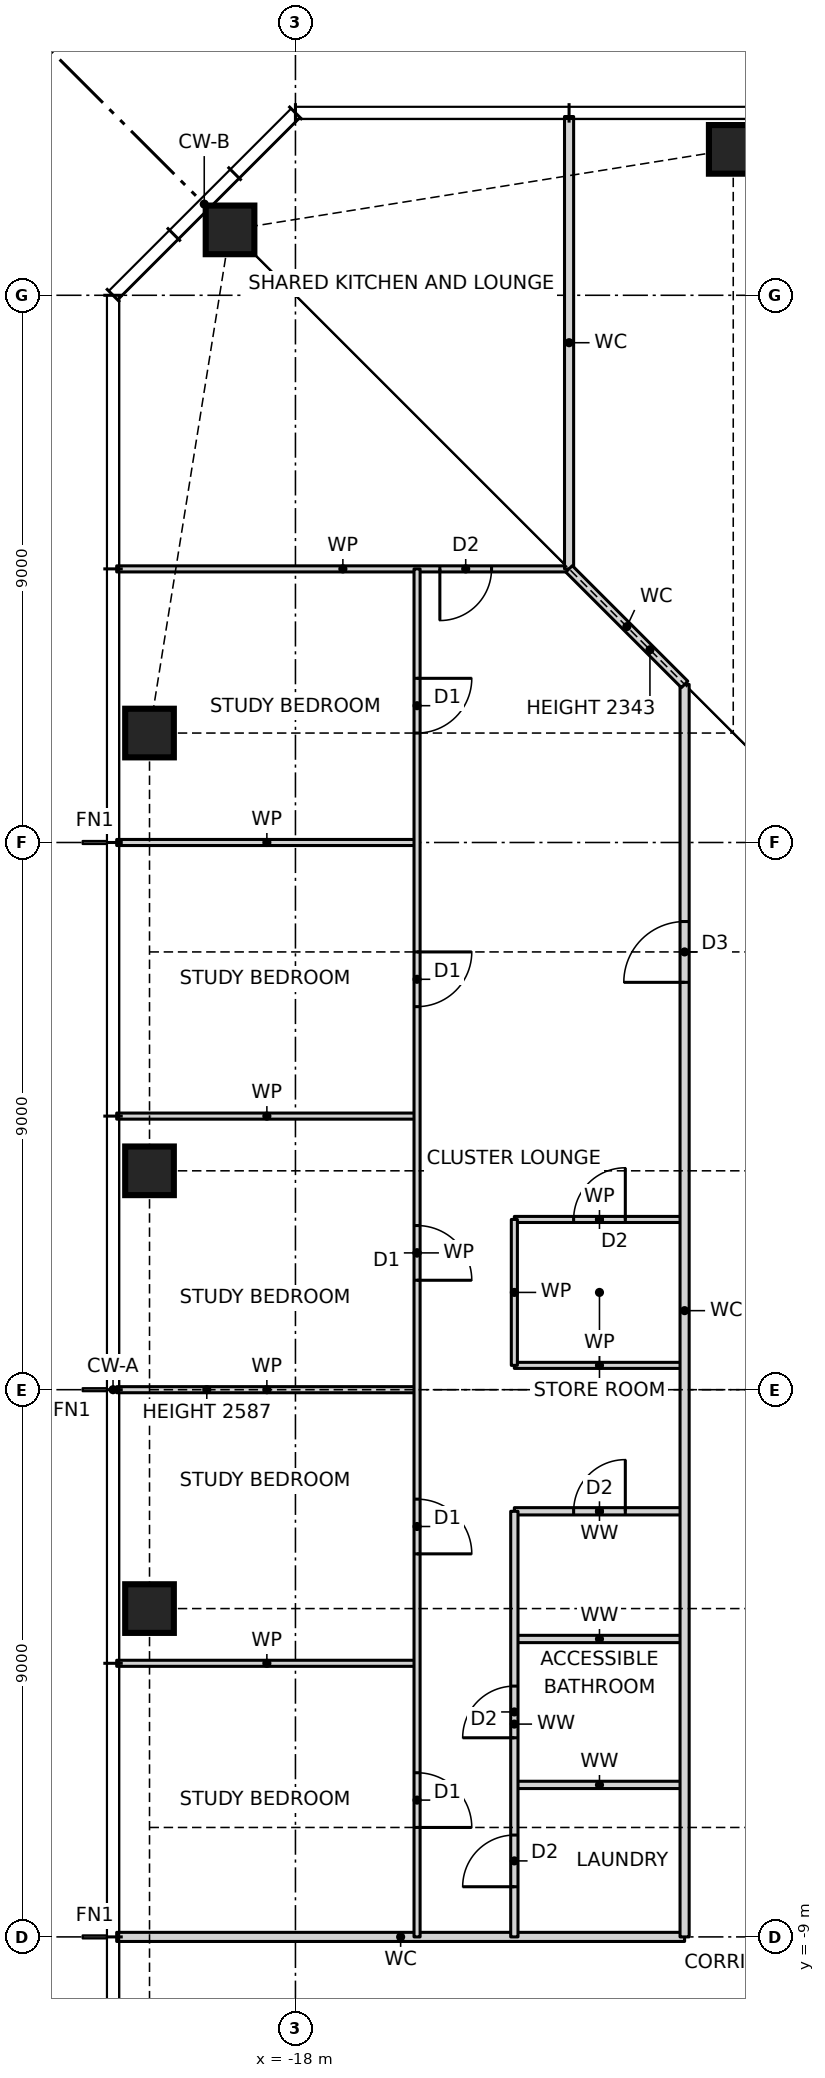
"""IFC4 building model, lengths in metres.
Left out: names, types, materials, properties, quantities, classifications, styles, units other than length and angle.
Written with IfcOpenShell. Run it as: python <this file> out.ifc"""

import sys

from ifc_helpers import new_model, si_unit, direction, frame, frame_2d, origin, origin_2d, place, context, subcontext, project, spatial, rectangle, hollow_rectangle, extrude, element, fill, save


model = new_model("IFC4")
c1 = context("Model", 3, precision=1e-05, world=origin(), true_north=direction((0.0, 1.0)))
c2 = subcontext(c1, "Body", "Model", "MODEL_VIEW")
j1 = project(units=[si_unit("LENGTHUNIT", "METRE"), si_unit("PLANEANGLEUNIT", "RADIAN")], contexts=[c1])
p1 = place(None, origin())
s1 = spatial("IfcSite", under=j1, at=p1, CompositionType="ELEMENT")
p2 = place(p1, origin())
s2 = spatial("IfcBuilding", under=s1, at=p2, CompositionType="ELEMENT")
p3 = place(p2, frame((0.0, 0.0, 84.0)))
s3 = spatial("IfcBuildingStorey", under=s2, at=p3, CompositionType="ELEMENT", Elevation=84.0)
for number, where, z_axis, x_axis in (
    (1, (-10.8, 20.4, 0.0), (0.0, 0.0, 1.0), (1.0, 0.0, 0.0)),
    (2, (-19.076, 19.076, 0.0), (0.0, 0.0, 1.0), (1.0, 0.0, 0.0)),
    (3, (-20.4, 10.8, 0.0), (0.0, 0.0, 1.0), (1.0, 0.0, 0.0)),
    (4, (-20.4, 3.6, 0.0), (0.0, 0.0, 1.0), (1.0, 0.0, 0.0)),
    (5, (-20.4, -3.6, 0.0), (0.0, 0.0, 1.0), (1.0, 0.0, 0.0)),
):
    element("IfcColumn", number, at=place(p3, frame(where, z_axis=z_axis, x_axis=x_axis)), inside=s3, PredefinedType="COLUMN", context=c2, shape_type="SweptSolid", body=[
        extrude(hollow_rectangle(XDim=0.8, YDim=0.8, WallThickness=0.07, at=origin_2d()), origin(), (0.0, 0.0, 1.0), 3.5),
    ])
p4 = place(p3, frame((-20.94, -9.0, 0.0), z_axis=(0.0, 0.0, 1.0), x_axis=(1.0, 0.0, 0.0)))
e6 = element("IfcWall", 6, at=p4, inside=s3, PredefinedType="PARTITIONING", context=c2, shape_type="SweptSolid", body=[
    extrude(rectangle(XDim=9.34, YDim=0.15, at=frame_2d((4.67, 0.0))), origin(), (0.0, 0.0, 1.0), 3.27),
])
p5 = place(p3, frame((-14.4, -6.5, 0.0), z_axis=(0.0, 0.0, 1.0), x_axis=(1.0, 0.0, 0.0)))
e7 = element("IfcWall", 7, at=p5, inside=s3, PredefinedType="PARTITIONING", context=c2, shape_type="SweptSolid", body=[
    extrude(rectangle(XDim=2.8, YDim=0.12, at=frame_2d((1.4, 0.0))), origin(), (0.0, 0.0, 1.0), 3.27),
])
p6 = place(p3, frame((-20.94, -4.5, 0.0), z_axis=(0.0, 0.0, 1.0), x_axis=(1.0, 0.0, 0.0)))
e8 = element("IfcWall", 8, at=p6, inside=s3, PredefinedType="PARTITIONING", context=c2, shape_type="SweptSolid", body=[
    extrude(rectangle(XDim=4.94, YDim=0.1, at=frame_2d((2.47, 0.0))), origin(), (0.0, 0.0, 1.0), 3.27),
])
p7 = place(p3, frame((-14.4, -4.1, 0.0), z_axis=(0.0, 0.0, 1.0), x_axis=(1.0, 0.0, 0.0)))
e9 = element("IfcWall", 9, at=p7, inside=s3, PredefinedType="PARTITIONING", context=c2, shape_type="SweptSolid", body=[
    extrude(rectangle(XDim=2.8, YDim=0.12, at=frame_2d((1.4, 0.0))), origin(), (0.0, 0.0, 1.0), 3.27),
])
p8 = place(p3, frame((-14.4, -2.0, 0.0), z_axis=(0.0, 0.0, 1.0), x_axis=(1.0, 0.0, 0.0)))
e10 = element("IfcWall", 10, at=p8, inside=s3, PredefinedType="PARTITIONING", context=c2, shape_type="SweptSolid", body=[
    extrude(rectangle(XDim=2.8, YDim=0.12, at=frame_2d((1.4, 0.0))), origin(), (0.0, 0.0, 1.0), 3.27),
])
p9 = place(p8, frame((0.975, 0.0, 0.0)))
e11 = element("IfcOpeningElement", 11, at=p9, cuts=e10, PredefinedType="OPENING", context=c2, shape_type="SweptSolid", body=[
    extrude(rectangle(XDim=0.85, YDim=2.1, at=frame_2d((0.425, 1.05))), frame((0.0, 0.07, 0.0), z_axis=(0.0, -1.0, 0.0), x_axis=(1.0, 0.0, 0.0)), (0.0, 0.0, 1.0), 0.14),
])
p10 = place(p3, frame((-20.94, 0.0, 0.0), z_axis=(0.0, 0.0, 1.0), x_axis=(1.0, 0.0, 0.0)))
e12 = element("IfcWall", 12, at=p10, inside=s3, PredefinedType="PARTITIONING", context=c2, shape_type="SweptSolid", body=[
    extrude(rectangle(XDim=4.94, YDim=0.1, at=frame_2d((2.47, 0.0))), origin(), (0.0, 0.0, 1.0), 2.587),
])
p11 = place(p3, frame((-14.4, 0.4, 0.0), z_axis=(0.0, 0.0, 1.0), x_axis=(1.0, 0.0, 0.0)))
e13 = element("IfcWall", 13, at=p11, inside=s3, PredefinedType="PARTITIONING", context=c2, shape_type="SweptSolid", body=[
    extrude(rectangle(XDim=2.8, YDim=0.1, at=frame_2d((1.4, 0.0))), origin(), (0.0, 0.0, 1.0), 3.27),
])
p12 = place(p3, frame((-14.4, 2.8, 0.0), z_axis=(0.0, 0.0, 1.0), x_axis=(1.0, 0.0, 0.0)))
e14 = element("IfcWall", 14, at=p12, inside=s3, PredefinedType="PARTITIONING", context=c2, shape_type="SweptSolid", body=[
    extrude(rectangle(XDim=2.8, YDim=0.1, at=frame_2d((1.4, 0.0))), origin(), (0.0, 0.0, 1.0), 3.27),
])
p13 = place(p12, frame((0.975, 0.0, 0.0)))
e15 = element("IfcOpeningElement", 15, at=p13, cuts=e14, PredefinedType="OPENING", context=c2, shape_type="SweptSolid", body=[
    extrude(rectangle(XDim=0.85, YDim=2.1, at=frame_2d((0.425, 1.05))), frame((0.0, 0.06, 0.0), z_axis=(0.0, -1.0, 0.0), x_axis=(1.0, 0.0, 0.0)), (0.0, 0.0, 1.0), 0.12),
])
for number, where, z_axis, x_axis in (
    (16, (-20.94, 4.5, 0.0), (0.0, 0.0, 1.0), (1.0, 0.0, 0.0)),
    (17, (-20.94, 9.0, 0.0), (0.0, 0.0, 1.0), (1.0, 0.0, 0.0)),
):
    element("IfcWall", number, at=place(p3, frame(where, z_axis=z_axis, x_axis=x_axis)), inside=s3, PredefinedType="PARTITIONING", context=c2, shape_type="SweptSolid", body=[
        extrude(rectangle(XDim=4.94, YDim=0.1, at=frame_2d((2.47, 0.0))), origin(), (0.0, 0.0, 1.0), 3.27),
    ])
p14 = place(p3, frame((-20.94, 13.5, 0.0), z_axis=(0.0, 0.0, 1.0), x_axis=(1.0, 0.0, 0.0)))
e18 = element("IfcWall", 18, at=p14, inside=s3, PredefinedType="PARTITIONING", context=c2, shape_type="SweptSolid", body=[
    extrude(rectangle(XDim=7.44, YDim=0.1, at=frame_2d((3.72, 0.0))), origin(), (0.0, 0.0, 1.0), 3.27),
])
p15 = place(p14, frame((5.315, 0.0, 0.0)))
e19 = element("IfcOpeningElement", 19, at=p15, cuts=e18, PredefinedType="OPENING", context=c2, shape_type="SweptSolid", body=[
    extrude(rectangle(XDim=0.85, YDim=2.1, at=frame_2d((0.425, 1.05))), frame((0.0, 0.06, 0.0), z_axis=(0.0, -1.0, 0.0), x_axis=(1.0, 0.0, 0.0)), (0.0, 0.0, 1.0), 0.12),
])
p16 = place(p3, frame((-11.6, -9.0, 0.0), z_axis=(0.0, 0.0, 1.0), x_axis=(0.0, 1.0, 0.0)))
e20 = element("IfcWall", 20, at=p16, inside=s3, PredefinedType="PARTITIONING", context=c2, shape_type="SweptSolid", body=[
    extrude(rectangle(XDim=20.6, YDim=0.15, at=frame_2d((10.3, 0.0))), origin(), (0.0, 0.0, 1.0), 3.27),
])
p17 = place(p16, frame((15.7, 0.0, 0.0)))
e21 = element("IfcOpeningElement", 21, at=p17, cuts=e20, PredefinedType="OPENING", context=c2, shape_type="SweptSolid", body=[
    extrude(rectangle(XDim=1.0, YDim=2.1, at=frame_2d((0.5, 1.05))), frame((0.0, 0.085, 0.0), z_axis=(0.0, -1.0, 0.0), x_axis=(1.0, 0.0, 0.0)), (0.0, 0.0, 1.0), 0.17),
])
p18 = place(p3, frame((-13.5, 13.5, 0.0), z_axis=(0.0, 0.0, 1.0), x_axis=(0.0, 1.0, 0.0)))
e22 = element("IfcWall", 22, at=p18, inside=s3, PredefinedType="PARTITIONING", context=c2, shape_type="SweptSolid", body=[
    extrude(rectangle(XDim=7.44, YDim=0.15, at=frame_2d((3.72, 0.0))), origin(), (0.0, 0.0, 1.0), 3.27),
])
p19 = place(p3, frame((-14.4, -9.0, 0.0), z_axis=(0.0, 0.0, 1.0), x_axis=(0.0, 1.0, 0.0)))
e23 = element("IfcWall", 23, at=p19, inside=s3, PredefinedType="PARTITIONING", context=c2, shape_type="SweptSolid", body=[
    extrude(rectangle(XDim=7.0, YDim=0.12, at=frame_2d((3.5, 0.0))), origin(), (0.0, 0.0, 1.0), 3.27),
])
p20 = place(p19, frame((3.275, 0.0, 0.0)))
e24 = element("IfcOpeningElement", 24, at=p20, cuts=e23, PredefinedType="OPENING", context=c2, shape_type="SweptSolid", body=[
    extrude(rectangle(XDim=0.85, YDim=2.1, at=frame_2d((0.425, 1.05))), frame((0.0, 0.07, 0.0), z_axis=(0.0, -1.0, 0.0), x_axis=(1.0, 0.0, 0.0)), (0.0, 0.0, 1.0), 0.14),
])
p21 = place(p19, frame((0.825, 0.0, 0.0)))
e25 = element("IfcOpeningElement", 25, at=p21, cuts=e23, PredefinedType="OPENING", context=c2, shape_type="SweptSolid", body=[
    extrude(rectangle(XDim=0.85, YDim=2.1, at=frame_2d((0.425, 1.05))), frame((0.0, 0.07, 0.0), z_axis=(0.0, -1.0, 0.0), x_axis=(1.0, 0.0, 0.0)), (0.0, 0.0, 1.0), 0.14),
])
p22 = place(p3, frame((-14.4, 0.4, 0.0), z_axis=(0.0, 0.0, 1.0), x_axis=(0.0, 1.0, 0.0)))
e26 = element("IfcWall", 26, at=p22, inside=s3, PredefinedType="PARTITIONING", context=c2, shape_type="SweptSolid", body=[
    extrude(rectangle(XDim=2.4, YDim=0.1, at=frame_2d((1.2, 0.0))), origin(), (0.0, 0.0, 1.0), 3.27),
])
p23 = place(p3, frame((-16.0, -9.0, 0.0), z_axis=(0.0, 0.0, 1.0), x_axis=(0.0, 1.0, 0.0)))
e27 = element("IfcWall", 27, at=p23, inside=s3, PredefinedType="PARTITIONING", context=c2, shape_type="SweptSolid", body=[
    extrude(rectangle(XDim=22.5, YDim=0.1, at=frame_2d((11.25, 0.0))), origin(), (0.0, 0.0, 1.0), 3.27),
])
p24 = place(p23, frame((19.8, 0.0, 0.0)))
e28 = element("IfcOpeningElement", 28, at=p24, cuts=e27, PredefinedType="OPENING", context=c2, shape_type="SweptSolid", body=[
    extrude(rectangle(XDim=0.9, YDim=2.1, at=frame_2d((0.45, 1.05))), frame((0.0, 0.06, 0.0), z_axis=(0.0, -1.0, 0.0), x_axis=(1.0, 0.0, 0.0)), (0.0, 0.0, 1.0), 0.12),
])
p25 = place(p23, frame((15.3, 0.0, 0.0)))
e29 = element("IfcOpeningElement", 29, at=p25, cuts=e27, PredefinedType="OPENING", context=c2, shape_type="SweptSolid", body=[
    extrude(rectangle(XDim=0.9, YDim=2.1, at=frame_2d((0.45, 1.05))), frame((0.0, 0.06, 0.0), z_axis=(0.0, -1.0, 0.0), x_axis=(1.0, 0.0, 0.0)), (0.0, 0.0, 1.0), 0.12),
])
p26 = place(p23, frame((10.8, 0.0, 0.0)))
e30 = element("IfcOpeningElement", 30, at=p26, cuts=e27, PredefinedType="OPENING", context=c2, shape_type="SweptSolid", body=[
    extrude(rectangle(XDim=0.9, YDim=2.1, at=frame_2d((0.45, 1.05))), frame((0.0, 0.06, 0.0), z_axis=(0.0, -1.0, 0.0), x_axis=(1.0, 0.0, 0.0)), (0.0, 0.0, 1.0), 0.12),
])
p27 = place(p23, frame((6.3, 0.0, 0.0)))
e31 = element("IfcOpeningElement", 31, at=p27, cuts=e27, PredefinedType="OPENING", context=c2, shape_type="SweptSolid", body=[
    extrude(rectangle(XDim=0.9, YDim=2.1, at=frame_2d((0.45, 1.05))), frame((0.0, 0.06, 0.0), z_axis=(0.0, -1.0, 0.0), x_axis=(1.0, 0.0, 0.0)), (0.0, 0.0, 1.0), 0.12),
])
p28 = place(p23, frame((1.8, 0.0, 0.0)))
e32 = element("IfcOpeningElement", 32, at=p28, cuts=e27, PredefinedType="OPENING", context=c2, shape_type="SweptSolid", body=[
    extrude(rectangle(XDim=0.9, YDim=2.1, at=frame_2d((0.45, 1.05))), frame((0.0, 0.06, 0.0), z_axis=(0.0, -1.0, 0.0), x_axis=(1.0, 0.0, 0.0)), (0.0, 0.0, 1.0), 0.12),
])
p29 = place(p3, frame((-11.6, 11.6, 0.0), z_axis=(0.0, 0.0, 1.0), x_axis=(-0.707106781187, 0.707106781187, 0.0)))
e33 = element("IfcWall", 33, at=p29, inside=s3, PredefinedType="PARTITIONING", context=c2, shape_type="SweptSolid", body=[
    extrude(rectangle(XDim=2.687, YDim=0.15, at=frame_2d((1.343, 0.0))), origin(), (0.0, 0.0, 1.0), 2.343),
])
p30 = place(p24, frame((0.9, 0.0, 0.0), z_axis=(0.0, 0.0, 1.0), x_axis=(-1.0, 0.0, 0.0)))
e34 = element("IfcDoor", 34, at=p30, inside=s3, OperationType="SINGLE_SWING_LEFT", PredefinedType="DOOR", context=c2, shape_type="SweptSolid", body=[
    extrude(rectangle(XDim=0.9, YDim=2.1, at=frame_2d((0.45, 1.05))), frame((0.0, 0.025, 0.0), z_axis=(0.0, -1.0, 0.0), x_axis=(1.0, 0.0, 0.0)), (0.0, 0.0, 1.0), 0.05),
])
fill(e28, e34)
p31 = place(p25, frame((0.9, 0.0, 0.0), z_axis=(0.0, 0.0, 1.0), x_axis=(-1.0, 0.0, 0.0)))
e35 = element("IfcDoor", 35, at=p31, inside=s3, OperationType="SINGLE_SWING_LEFT", PredefinedType="DOOR", context=c2, shape_type="SweptSolid", body=[
    extrude(rectangle(XDim=0.9, YDim=2.1, at=frame_2d((0.45, 1.05))), frame((0.0, 0.025, 0.0), z_axis=(0.0, -1.0, 0.0), x_axis=(1.0, 0.0, 0.0)), (0.0, 0.0, 1.0), 0.05),
])
fill(e29, e35)
p32 = place(p26, frame((0.9, 0.0, 0.0), z_axis=(0.0, 0.0, 1.0), x_axis=(-1.0, 0.0, 0.0)))
e36 = element("IfcDoor", 36, at=p32, inside=s3, OperationType="SINGLE_SWING_RIGHT", PredefinedType="DOOR", context=c2, shape_type="SweptSolid", body=[
    extrude(rectangle(XDim=0.9, YDim=2.1, at=frame_2d((0.45, 1.05))), frame((0.0, 0.025, 0.0), z_axis=(0.0, -1.0, 0.0), x_axis=(1.0, 0.0, 0.0)), (0.0, 0.0, 1.0), 0.05),
])
fill(e30, e36)
p33 = place(p27, frame((0.9, 0.0, 0.0), z_axis=(0.0, 0.0, 1.0), x_axis=(-1.0, 0.0, 0.0)))
e37 = element("IfcDoor", 37, at=p33, inside=s3, OperationType="SINGLE_SWING_RIGHT", PredefinedType="DOOR", context=c2, shape_type="SweptSolid", body=[
    extrude(rectangle(XDim=0.9, YDim=2.1, at=frame_2d((0.45, 1.05))), frame((0.0, 0.025, 0.0), z_axis=(0.0, -1.0, 0.0), x_axis=(1.0, 0.0, 0.0)), (0.0, 0.0, 1.0), 0.05),
])
fill(e31, e37)
p34 = place(p28, frame((0.9, 0.0, 0.0), z_axis=(0.0, 0.0, 1.0), x_axis=(-1.0, 0.0, 0.0)))
e38 = element("IfcDoor", 38, at=p34, inside=s3, OperationType="SINGLE_SWING_RIGHT", PredefinedType="DOOR", context=c2, shape_type="SweptSolid", body=[
    extrude(rectangle(XDim=0.9, YDim=2.1, at=frame_2d((0.45, 1.05))), frame((0.0, 0.025, 0.0), z_axis=(0.0, -1.0, 0.0), x_axis=(1.0, 0.0, 0.0)), (0.0, 0.0, 1.0), 0.05),
])
fill(e32, e38)
p35 = place(p17, origin())
e39 = element("IfcDoor", 39, at=p35, inside=s3, OperationType="SINGLE_SWING_LEFT", PredefinedType="DOOR", context=c2, shape_type="SweptSolid", body=[
    extrude(rectangle(XDim=1.0, YDim=2.1, at=frame_2d((0.5, 1.05))), frame((0.0, 0.025, 0.0), z_axis=(0.0, -1.0, 0.0), x_axis=(1.0, 0.0, 0.0)), (0.0, 0.0, 1.0), 0.05),
])
fill(e21, e39)
p36 = place(p13, origin())
e40 = element("IfcDoor", 40, at=p36, inside=s3, OperationType="SINGLE_SWING_RIGHT", PredefinedType="DOOR", context=c2, shape_type="SweptSolid", body=[
    extrude(rectangle(XDim=0.85, YDim=2.1, at=frame_2d((0.425, 1.05))), frame((0.0, 0.025, 0.0), z_axis=(0.0, -1.0, 0.0), x_axis=(1.0, 0.0, 0.0)), (0.0, 0.0, 1.0), 0.05),
])
fill(e15, e40)
p37 = place(p9, origin())
e41 = element("IfcDoor", 41, at=p37, inside=s3, OperationType="SINGLE_SWING_RIGHT", PredefinedType="DOOR", context=c2, shape_type="SweptSolid", body=[
    extrude(rectangle(XDim=0.85, YDim=2.1, at=frame_2d((0.425, 1.05))), frame((0.0, 0.025, 0.0), z_axis=(0.0, -1.0, 0.0), x_axis=(1.0, 0.0, 0.0)), (0.0, 0.0, 1.0), 0.05),
])
fill(e11, e41)
p38 = place(p20, origin())
e42 = element("IfcDoor", 42, at=p38, inside=s3, OperationType="SINGLE_SWING_LEFT", PredefinedType="DOOR", context=c2, shape_type="SweptSolid", body=[
    extrude(rectangle(XDim=0.85, YDim=2.1, at=frame_2d((0.425, 1.05))), frame((0.0, 0.025, 0.0), z_axis=(0.0, -1.0, 0.0), x_axis=(1.0, 0.0, 0.0)), (0.0, 0.0, 1.0), 0.05),
])
fill(e24, e42)
p39 = place(p21, origin())
e43 = element("IfcDoor", 43, at=p39, inside=s3, OperationType="SINGLE_SWING_LEFT", PredefinedType="DOOR", context=c2, shape_type="SweptSolid", body=[
    extrude(rectangle(XDim=0.85, YDim=2.1, at=frame_2d((0.425, 1.05))), frame((0.0, 0.025, 0.0), z_axis=(0.0, -1.0, 0.0), x_axis=(1.0, 0.0, 0.0)), (0.0, 0.0, 1.0), 0.05),
])
fill(e25, e43)
p40 = place(p15, frame((0.85, 0.0, 0.0), z_axis=(0.0, 0.0, 1.0), x_axis=(-1.0, 0.0, 0.0)))
e44 = element("IfcDoor", 44, at=p40, inside=s3, OperationType="SINGLE_SWING_RIGHT", PredefinedType="DOOR", context=c2, shape_type="SweptSolid", body=[
    extrude(rectangle(XDim=0.85, YDim=2.1, at=frame_2d((0.425, 1.05))), frame((0.0, 0.025, 0.0), z_axis=(0.0, -1.0, 0.0), x_axis=(1.0, 0.0, 0.0)), (0.0, 0.0, 1.0), 0.05),
])
fill(e19, e44)
save(model, sys.argv[1])
